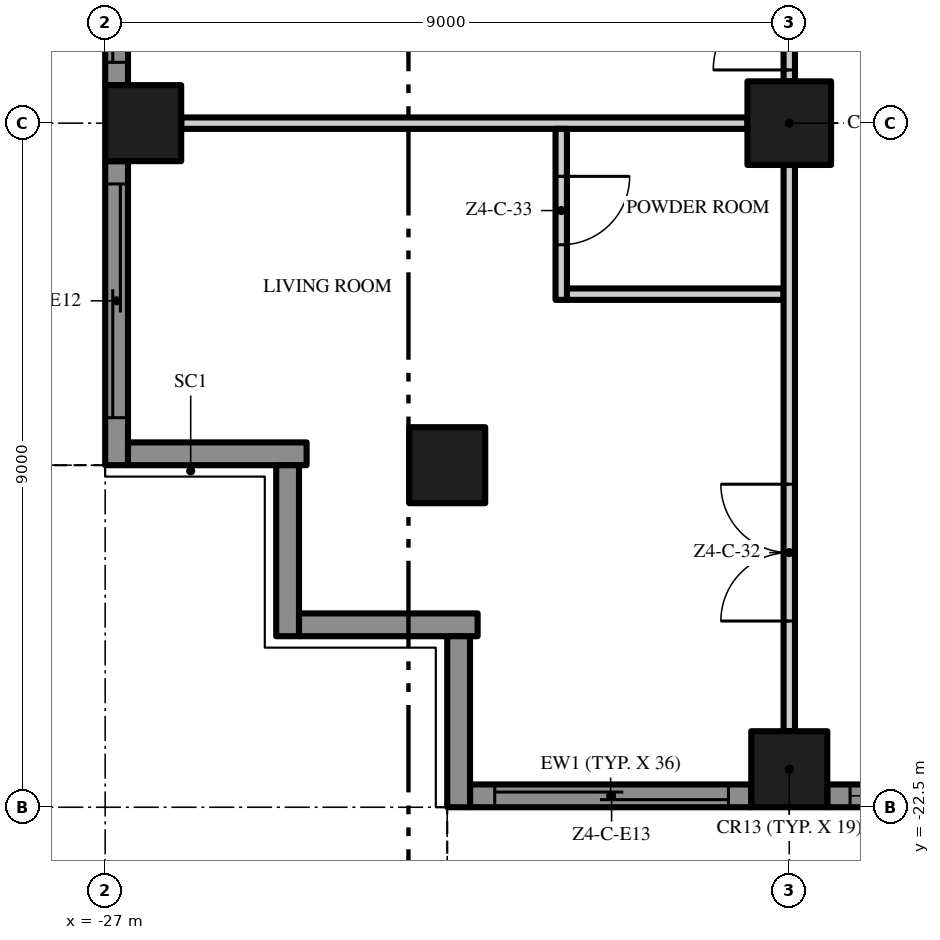
"""IFC4 building model, lengths in metres.
Left out: names, types, materials, properties, quantities, classifications, styles, units other than length and angle.
Written with IfcOpenShell. Run it as: python <this file> out.ifc"""

import sys

from ifc_helpers import new_model, si_unit, direction, frame, frame_2d, origin, origin_2d, place, context, subcontext, project, spatial, polyline, rectangle, outline, extrude, element, fill, save


model = new_model("IFC4")
c1 = context("Model", 3, precision=1e-05, world=origin(), true_north=direction((0.0, 1.0)))
c2 = subcontext(c1, "Body", "Model", "MODEL_VIEW")
j1 = project(units=[si_unit("LENGTHUNIT", "METRE"), si_unit("PLANEANGLEUNIT", "RADIAN")], contexts=[c1])
p1 = place(None, origin())
s1 = spatial("IfcSite", under=j1, at=p1, CompositionType="ELEMENT")
p2 = place(p1, origin())
s2 = spatial("IfcBuilding", under=s1, at=p2, CompositionType="ELEMENT")
p3 = place(p2, frame((0.0, 0.0, 214.8)))
s3 = spatial("IfcBuildingStorey", under=s2, at=p3, CompositionType="ELEMENT", Elevation=214.8)
p4 = place(p3, frame((-18.0, -13.5, 0.0), z_axis=(0.0, 0.0, 1.0), x_axis=(1.0, 0.0, 0.0)))
e1 = element("IfcColumn", 1, at=p4, inside=s3, PredefinedType="COLUMN", context=c2, shape_type="SweptSolid", body=[
    extrude(rectangle(XDim=1.1, YDim=1.1, at=origin_2d()), origin(), (0.0, 0.0, 1.0), 3.5),
])
for number, where, z_axis, x_axis in (
    (2, (-18.0, -22.0, 0.0), (0.0, 0.0, 1.0), (1.0, 0.0, 0.0)),
    (3, (-26.5, -13.5, 0.0), (0.0, 0.0, 1.0), (1.0, 0.0, 0.0)),
    (4, (-22.5, -18.0, 0.0), (0.0, 0.0, 1.0), (1.0, 0.0, 0.0)),
):
    element("IfcColumn", number, at=place(p3, frame(where, z_axis=z_axis, x_axis=x_axis)), inside=s3, PredefinedType="COLUMN", context=c2, shape_type="SweptSolid", body=[
        extrude(rectangle(XDim=1.0, YDim=1.0, at=origin_2d()), origin(), (0.0, 0.0, 1.0), 3.5),
    ])
p5 = place(p3, frame((-18.5, -22.35, 0.0), z_axis=(0.0, 0.0, 1.0), x_axis=(-1.0, 0.0, 0.0)))
e5 = element("IfcWall", 5, at=p5, inside=s3, PredefinedType="SOLIDWALL", context=c2, shape_type="SweptSolid", body=[
    extrude(rectangle(XDim=3.7, YDim=0.3, at=frame_2d((1.85, 0.0))), origin(), (0.0, 0.0, 1.0), 3.5),
])
p6 = place(p5, frame((0.3, 0.0, 0.0)))
e6 = element("IfcOpeningElement", 6, at=p6, cuts=e5, PredefinedType="OPENING", context=c2, shape_type="SweptSolid", body=[
    extrude(rectangle(XDim=3.075, YDim=2.4, at=frame_2d((1.538, 1.2))), frame((0.0, 0.16, 0.0), z_axis=(0.0, -1.0, 0.0), x_axis=(1.0, 0.0, 0.0)), (0.0, 0.0, 1.0), 0.32),
])
p7 = place(p3, frame((-9.5, -22.35, 0.0), z_axis=(0.0, 0.0, 1.0), x_axis=(-1.0, 0.0, 0.0)))
e7 = element("IfcWall", 7, at=p7, inside=s3, PredefinedType="SOLIDWALL", context=c2, shape_type="SweptSolid", body=[
    extrude(rectangle(XDim=8.0, YDim=0.3, at=frame_2d((4.0, 0.0))), origin(), (0.0, 0.0, 1.0), 3.5),
])
p8 = place(p7, frame((4.625, 0.0, 0.45)))
e8 = element("IfcOpeningElement", 8, at=p8, cuts=e7, PredefinedType="OPENING", context=c2, shape_type="SweptSolid", body=[
    extrude(rectangle(XDim=3.075, YDim=2.65, at=frame_2d((1.538, 1.325))), frame((0.0, 0.16, 0.0), z_axis=(0.0, -1.0, 0.0), x_axis=(1.0, 0.0, 0.0)), (0.0, 0.0, 1.0), 0.32),
])
p9 = place(p7, frame((0.3, 0.0, 0.45)))
e9 = element("IfcOpeningElement", 9, at=p9, cuts=e7, PredefinedType="OPENING", context=c2, shape_type="SweptSolid", body=[
    extrude(rectangle(XDim=3.075, YDim=2.65, at=frame_2d((1.538, 1.325))), frame((0.0, 0.16, 0.0), z_axis=(0.0, -1.0, 0.0), x_axis=(1.0, 0.0, 0.0)), (0.0, 0.0, 1.0), 0.32),
])
p10 = place(p3, frame((-26.85, -13.0, 0.0), z_axis=(0.0, 0.0, 1.0), x_axis=(0.0, 1.0, 0.0)))
e10 = element("IfcWall", 10, at=p10, inside=s3, PredefinedType="SOLIDWALL", context=c2, shape_type="SweptSolid", body=[
    extrude(rectangle(XDim=8.0, YDim=0.3, at=frame_2d((4.0, 0.0))), origin(), (0.0, 0.0, 1.0), 3.5),
])
p11 = place(p10, frame((4.625, 0.0, 0.45)))
e11 = element("IfcOpeningElement", 11, at=p11, cuts=e10, PredefinedType="OPENING", context=c2, shape_type="SweptSolid", body=[
    extrude(rectangle(XDim=3.075, YDim=2.65, at=frame_2d((1.538, 1.325))), frame((0.0, 0.16, 0.0), z_axis=(0.0, -1.0, 0.0), x_axis=(1.0, 0.0, 0.0)), (0.0, 0.0, 1.0), 0.32),
])
p12 = place(p10, frame((0.3, 0.0, 0.0)))
e12 = element("IfcOpeningElement", 12, at=p12, cuts=e10, PredefinedType="OPENING", context=c2, shape_type="SweptSolid", body=[
    extrude(rectangle(XDim=3.075, YDim=2.4, at=frame_2d((1.538, 1.2))), frame((0.0, 0.16, 0.0), z_axis=(0.0, -1.0, 0.0), x_axis=(1.0, 0.0, 0.0)), (0.0, 0.0, 1.0), 0.32),
])
p13 = place(p3, frame((-26.85, -18.0, 0.0), z_axis=(0.0, 0.0, 1.0), x_axis=(0.0, 1.0, 0.0)))
e13 = element("IfcWall", 13, at=p13, inside=s3, PredefinedType="SOLIDWALL", context=c2, shape_type="SweptSolid", body=[
    extrude(rectangle(XDim=4.0, YDim=0.3, at=frame_2d((2.0, 0.0))), origin(), (0.0, 0.0, 1.0), 3.5),
])
p14 = place(p13, frame((0.625, 0.0, 0.0)))
e14 = element("IfcOpeningElement", 14, at=p14, cuts=e13, PredefinedType="OPENING", context=c2, shape_type="SweptSolid", body=[
    extrude(rectangle(XDim=3.075, YDim=2.4, at=frame_2d((1.538, 1.2))), frame((0.0, 0.16, 0.0), z_axis=(0.0, -1.0, 0.0), x_axis=(1.0, 0.0, 0.0)), (0.0, 0.0, 1.0), 0.32),
])
p15 = place(p3, frame((-24.35, -17.85, 0.0), z_axis=(0.0, 0.0, 1.0), x_axis=(-1.0, 0.0, 0.0)))
e15 = element("IfcWall", 15, at=p15, inside=s3, PredefinedType="SOLIDWALL", context=c2, shape_type="SweptSolid", body=[
    extrude(rectangle(XDim=2.35, YDim=0.3, at=frame_2d((1.175, 0.0))), origin(), (0.0, 0.0, 1.0), 3.5),
])
p16 = place(p3, frame((-24.6, -20.25, 0.0), z_axis=(0.0, 0.0, 1.0), x_axis=(0.0, 1.0, 0.0)))
e16 = element("IfcWall", 16, at=p16, inside=s3, PredefinedType="SOLIDWALL", context=c2, shape_type="SweptSolid", body=[
    extrude(rectangle(XDim=2.25, YDim=0.3, at=frame_2d((1.125, 0.0))), origin(), (0.0, 0.0, 1.0), 3.5),
])
p17 = place(p3, frame((-22.1, -20.1, 0.0), z_axis=(0.0, 0.0, 1.0), x_axis=(-1.0, 0.0, 0.0)))
e17 = element("IfcWall", 17, at=p17, inside=s3, PredefinedType="SOLIDWALL", context=c2, shape_type="SweptSolid", body=[
    extrude(rectangle(XDim=2.35, YDim=0.3, at=frame_2d((1.175, 0.0))), origin(), (0.0, 0.0, 1.0), 3.5),
])
p18 = place(p3, frame((-22.35, -22.5, 0.0), z_axis=(0.0, 0.0, 1.0), x_axis=(0.0, 1.0, 0.0)))
e18 = element("IfcWall", 18, at=p18, inside=s3, PredefinedType="SOLIDWALL", context=c2, shape_type="SweptSolid", body=[
    extrude(rectangle(XDim=2.25, YDim=0.3, at=frame_2d((1.125, 0.0))), origin(), (0.0, 0.0, 1.0), 3.5),
])
p19 = place(p3, origin())
e19 = element("IfcWall", 19, at=p19, inside=s3, PredefinedType="USERDEFINED", context=c2, shape_type="SweptSolid", body=[
    extrude(outline(polyline([(-22.5, -25.149), (-21.0, -25.485), (-20.625, -25.5), (-19.5, -25.369), (-18.0, -24.845), (-16.5, -24.112), (-15.0, -23.451), (-13.5, -23.115), (-13.125, -23.1), (-12.0, -23.231), (-10.5, -23.755), (-9.0, -24.488), (-7.5, -25.149), (-6.0, -25.485), (-5.625, -25.5), (-4.5, -25.369), (-3.0, -24.845), (-1.5, -24.112), (0.0, -23.451), (1.5, -23.115), (1.875, -23.1), (3.0, -23.231), (4.5, -23.755), (6.0, -24.488), (7.5, -25.149), (9.0, -25.485), (9.375, -25.5), (10.5, -25.369), (12.0, -24.845), (13.5, -24.112), (15.0, -23.451), (16.5, -23.115), (16.875, -23.1), (18.0, -23.231), (19.5, -23.755), (21.0, -24.488), (22.5, -25.149), (22.601, -24.92), (21.105, -24.261), (19.596, -23.524), (18.056, -22.986), (16.885, -22.849), (16.467, -22.866), (14.921, -23.213), (13.395, -23.885), (11.904, -24.614), (10.444, -25.124), (9.365, -25.249), (9.033, -25.236), (7.579, -24.91), (6.105, -24.261), (4.596, -23.524), (3.056, -22.986), (1.885, -22.849), (1.467, -22.866), (-0.079, -23.213), (-1.605, -23.885), (-3.096, -24.614), (-4.556, -25.124), (-5.635, -25.249), (-5.967, -25.236), (-7.421, -24.91), (-8.895, -24.261), (-10.404, -23.524), (-11.944, -22.986), (-13.115, -22.849), (-13.533, -22.866), (-15.079, -23.213), (-16.605, -23.885), (-18.096, -24.614), (-19.556, -25.124), (-20.635, -25.249), (-20.967, -25.236), (-22.445, -24.905), (-22.5, -25.149)])), origin(), (0.0, 0.0, 1.0), 0.9),
])
p20 = place(p3, origin())
e20 = element("IfcWall", 20, at=p20, inside=s3, PredefinedType="USERDEFINED", context=c2, shape_type="SweptSolid", body=[
    extrude(outline(polyline([(-29.649, 18.0), (-29.985, 16.5), (-30.0, 16.125), (-29.869, 15.0), (-29.345, 13.5), (-28.612, 12.0), (-27.951, 10.5), (-27.615, 9.0), (-27.6, 8.625), (-27.731, 7.5), (-28.255, 6.0), (-28.988, 4.5), (-29.649, 3.0), (-29.985, 1.5), (-30.0, 1.125), (-29.869, 0.0), (-29.345, -1.5), (-28.612, -3.0), (-27.951, -4.5), (-27.615, -6.0), (-27.6, -6.375), (-27.731, -7.5), (-28.255, -9.0), (-28.988, -10.5), (-29.649, -12.0), (-29.985, -13.5), (-30.0, -13.875), (-29.869, -15.0), (-29.345, -16.5), (-28.612, -18.0), (-28.388, -17.89), (-29.114, -16.404), (-29.624, -14.944), (-29.749, -13.865), (-29.736, -13.533), (-29.41, -12.079), (-28.761, -10.605), (-28.024, -9.096), (-27.486, -7.556), (-27.349, -6.385), (-27.366, -5.967), (-27.713, -4.421), (-28.385, -2.895), (-29.114, -1.404), (-29.624, 0.056), (-29.749, 1.135), (-29.736, 1.467), (-29.41, 2.921), (-28.761, 4.395), (-28.024, 5.904), (-27.486, 7.444), (-27.349, 8.615), (-27.366, 9.033), (-27.713, 10.579), (-28.385, 12.105), (-29.114, 13.596), (-29.624, 15.056), (-29.749, 16.135), (-29.736, 16.467), (-29.405, 17.945), (-29.649, 18.0)])), origin(), (0.0, 0.0, 1.0), 0.9),
])
p21 = place(p3, frame((-20.925, -15.75, 0.0), z_axis=(0.0, 0.0, 1.0), x_axis=(1.0, 0.0, 0.0)))
e21 = element("IfcWall", 21, at=p21, inside=s3, PredefinedType="PARTITIONING", context=c2, shape_type="SweptSolid", body=[
    extrude(rectangle(XDim=2.85, YDim=0.15, at=frame_2d((1.425, 0.0))), origin(), (0.0, 0.0, 1.0), 3.5),
])
p22 = place(p3, frame((-26.0, -13.5, 0.0), z_axis=(0.0, 0.0, 1.0), x_axis=(1.0, 0.0, 0.0)))
e22 = element("IfcWall", 22, at=p22, inside=s3, PredefinedType="PARTITIONING", context=c2, shape_type="SweptSolid", body=[
    extrude(rectangle(XDim=7.45, YDim=0.15, at=frame_2d((3.725, 0.0))), origin(), (0.0, 0.0, 1.0), 3.5),
])
p23 = place(p3, frame((-21.0, -13.575, 0.0), z_axis=(0.0, 0.0, 1.0), x_axis=(0.0, -1.0, 0.0)))
e23 = element("IfcWall", 23, at=p23, inside=s3, PredefinedType="PARTITIONING", context=c2, shape_type="SweptSolid", body=[
    extrude(rectangle(XDim=2.25, YDim=0.15, at=frame_2d((1.125, 0.0))), origin(), (0.0, 0.0, 1.0), 3.5),
])
p24 = place(p23, frame((0.625, 0.0, 0.0)))
e24 = element("IfcOpeningElement", 24, at=p24, cuts=e23, PredefinedType="OPENING", context=c2, shape_type="SweptSolid", body=[
    extrude(rectangle(XDim=0.9, YDim=2.1, at=frame_2d((0.45, 1.05))), frame((0.0, 0.085, 0.0), z_axis=(0.0, -1.0, 0.0), x_axis=(1.0, 0.0, 0.0)), (0.0, 0.0, 1.0), 0.17),
])
p25 = place(p3, frame((-18.0, -21.5, 0.0), z_axis=(0.0, 0.0, 1.0), x_axis=(0.0, 1.0, 0.0)))
e25 = element("IfcWall", 25, at=p25, inside=s3, PredefinedType="PARTITIONING", context=c2, shape_type="SweptSolid", body=[
    extrude(rectangle(XDim=7.45, YDim=0.15, at=frame_2d((3.725, 0.0))), origin(), (0.0, 0.0, 1.0), 3.5),
])
p26 = place(p25, frame((1.45, 0.0, 0.0)))
e26 = element("IfcOpeningElement", 26, at=p26, cuts=e25, PredefinedType="OPENING", context=c2, shape_type="SweptSolid", body=[
    extrude(rectangle(XDim=1.8, YDim=2.4, at=frame_2d((0.9, 1.2))), frame((0.0, 0.085, 0.0), z_axis=(0.0, -1.0, 0.0), x_axis=(1.0, 0.0, 0.0)), (0.0, 0.0, 1.0), 0.17),
])
p27 = place(p3, frame((-18.0, -12.95, 0.0), z_axis=(0.0, 0.0, 1.0), x_axis=(0.0, 1.0, 0.0)))
e27 = element("IfcWall", 27, at=p27, inside=s3, PredefinedType="PARTITIONING", context=c2, shape_type="SweptSolid", body=[
    extrude(rectangle(XDim=7.9, YDim=0.15, at=frame_2d((3.95, 0.0))), origin(), (0.0, 0.0, 1.0), 3.5),
])
p28 = place(p27, frame((6.75, 0.0, 0.0)))
e28 = element("IfcOpeningElement", 28, at=p28, cuts=e27, PredefinedType="OPENING", context=c2, shape_type="SweptSolid", body=[
    extrude(rectangle(XDim=1.0, YDim=2.4, at=frame_2d((0.5, 1.2))), frame((0.0, 0.085, 0.0), z_axis=(0.0, -1.0, 0.0), x_axis=(1.0, 0.0, 0.0)), (0.0, 0.0, 1.0), 0.17),
])
p29 = place(p27, frame((0.15, 0.0, 0.0)))
e29 = element("IfcOpeningElement", 29, at=p29, cuts=e27, PredefinedType="OPENING", context=c2, shape_type="SweptSolid", body=[
    extrude(rectangle(XDim=1.0, YDim=2.4, at=frame_2d((0.5, 1.2))), frame((0.0, 0.085, 0.0), z_axis=(0.0, -1.0, 0.0), x_axis=(1.0, 0.0, 0.0)), (0.0, 0.0, 1.0), 0.17),
])
p30 = place(p6, origin())
e30 = element("IfcDoor", 30, at=p30, inside=s3, OperationType="SINGLE_SWING_LEFT", PredefinedType="DOOR", context=c2, shape_type="SweptSolid", body=[
    extrude(rectangle(XDim=3.075, YDim=2.4, at=frame_2d((1.538, 1.2))), frame((0.0, 0.025, 0.0), z_axis=(0.0, -1.0, 0.0), x_axis=(1.0, 0.0, 0.0)), (0.0, 0.0, 1.0), 0.05),
])
fill(e6, e30)
p31 = place(p8, origin())
e31 = element("IfcWindow", 31, at=p31, inside=s3, PartitioningType="SINGLE_PANEL", PredefinedType="WINDOW", context=c2, shape_type="SweptSolid", body=[
    extrude(rectangle(XDim=3.075, YDim=2.65, at=frame_2d((1.538, 1.325))), frame((0.0, 0.03, 0.0), z_axis=(0.0, -1.0, 0.0), x_axis=(1.0, 0.0, 0.0)), (0.0, 0.0, 1.0), 0.06),
])
fill(e8, e31)
p32 = place(p12, origin())
e32 = element("IfcDoor", 32, at=p32, inside=s3, OperationType="SINGLE_SWING_LEFT", PredefinedType="DOOR", context=c2, shape_type="SweptSolid", body=[
    extrude(rectangle(XDim=3.075, YDim=2.4, at=frame_2d((1.538, 1.2))), frame((0.0, 0.025, 0.0), z_axis=(0.0, -1.0, 0.0), x_axis=(1.0, 0.0, 0.0)), (0.0, 0.0, 1.0), 0.05),
])
fill(e12, e32)
p33 = place(p14, origin())
e33 = element("IfcDoor", 33, at=p33, inside=s3, OperationType="SINGLE_SWING_LEFT", PredefinedType="DOOR", context=c2, shape_type="SweptSolid", body=[
    extrude(rectangle(XDim=3.075, YDim=2.4, at=frame_2d((1.538, 1.2))), frame((0.0, 0.025, 0.0), z_axis=(0.0, -1.0, 0.0), x_axis=(1.0, 0.0, 0.0)), (0.0, 0.0, 1.0), 0.05),
])
fill(e14, e33)
p34 = place(p29, origin())
e34 = element("IfcDoor", 34, at=p34, inside=s3, OperationType="SINGLE_SWING_LEFT", PredefinedType="DOOR", context=c2, shape_type="SweptSolid", body=[
    extrude(rectangle(XDim=1.0, YDim=2.4, at=frame_2d((0.5, 1.2))), frame((0.0, 0.025, 0.0), z_axis=(0.0, -1.0, 0.0), x_axis=(1.0, 0.0, 0.0)), (0.0, 0.0, 1.0), 0.05),
])
fill(e29, e34)
p35 = place(p26, origin())
e35 = element("IfcDoor", 35, at=p35, inside=s3, OperationType="DOUBLE_DOOR_SINGLE_SWING", PredefinedType="DOOR", context=c2, shape_type="SweptSolid", body=[
    extrude(rectangle(XDim=1.8, YDim=2.4, at=frame_2d((0.9, 1.2))), frame((0.0, 0.025, 0.0), z_axis=(0.0, -1.0, 0.0), x_axis=(1.0, 0.0, 0.0)), (0.0, 0.0, 1.0), 0.05),
])
fill(e26, e35)
p36 = place(p24, origin())
e36 = element("IfcDoor", 36, at=p36, inside=s3, OperationType="SINGLE_SWING_LEFT", PredefinedType="DOOR", context=c2, shape_type="SweptSolid", body=[
    extrude(rectangle(XDim=0.9, YDim=2.1, at=frame_2d((0.45, 1.05))), frame((0.0, 0.025, 0.0), z_axis=(0.0, -1.0, 0.0), x_axis=(1.0, 0.0, 0.0)), (0.0, 0.0, 1.0), 0.05),
])
fill(e24, e36)
save(model, sys.argv[1])
